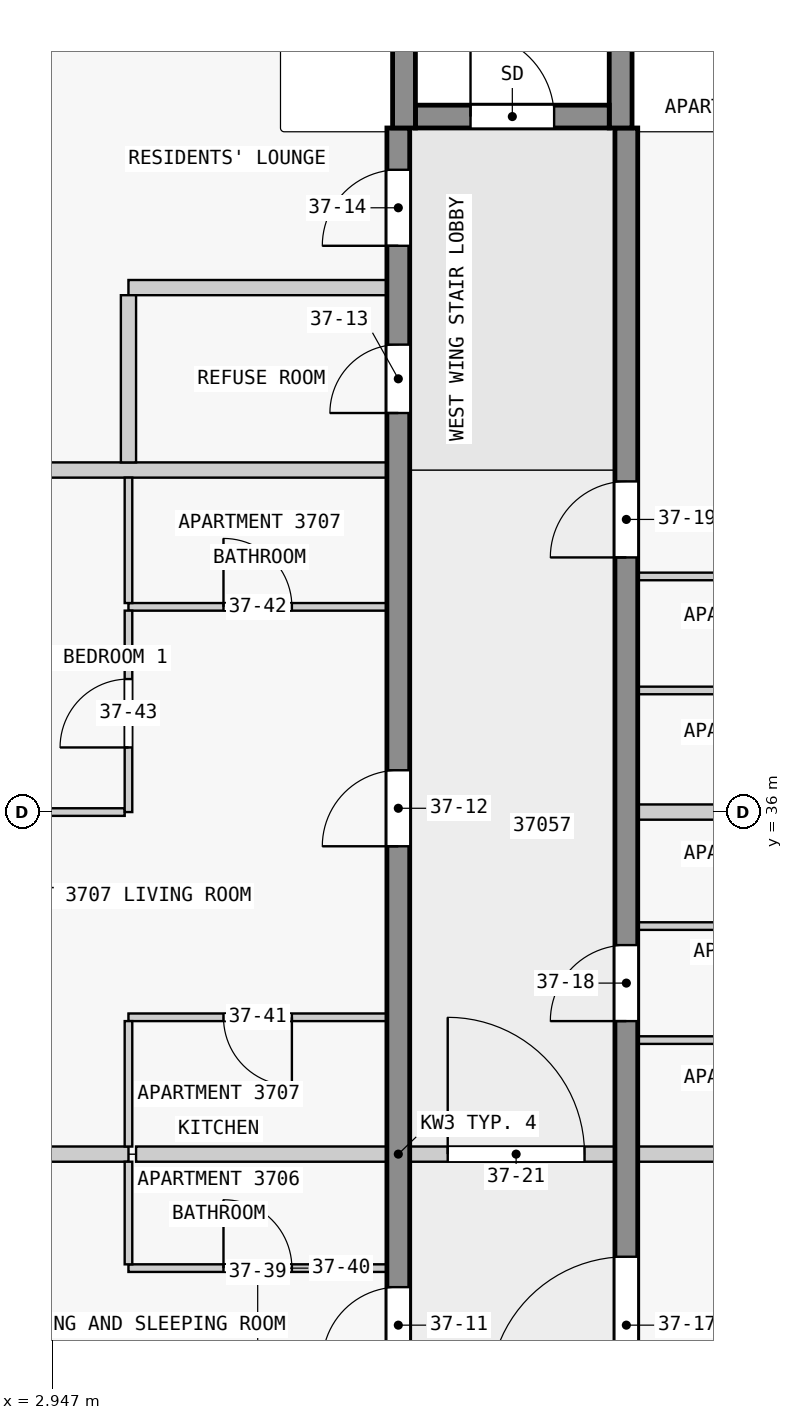
"""IFC4 building model, lengths in metres.
Left out: names, types, materials, properties, quantities, classifications, styles, units other than length and angle.
Written with IfcOpenShell. Run it as: python <this file> out.ifc"""

import sys

from ifc_helpers import new_model, si_unit, direction, frame, frame_2d, origin, place, context, subcontext, project, spatial, rectangle, extrude, element, fill, save


model = new_model("IFC4")
c1 = context("Model", 3, precision=1e-05, world=origin(), true_north=direction((0.0, 1.0)))
c2 = subcontext(c1, "Body", "Model", "MODEL_VIEW")
j1 = project(units=[si_unit("LENGTHUNIT", "METRE"), si_unit("PLANEANGLEUNIT", "RADIAN")], contexts=[c1])
p1 = place(None, origin())
s1 = spatial("IfcSite", under=j1, at=p1, CompositionType="ELEMENT")
p2 = place(p1, origin())
s2 = spatial("IfcBuilding", under=s1, at=p2, CompositionType="ELEMENT")
p3 = place(p2, frame((0.0, 0.0, 146.4)))
s3 = spatial("IfcBuildingStorey", under=s2, at=p3, CompositionType="ELEMENT", Elevation=146.4)
p4 = place(p3, frame((7.725, 45.15, 0.0), z_axis=(0.0, 0.0, 1.0), x_axis=(1.0, 0.0, 0.0)))
e1 = element("IfcWall", 1, at=p4, inside=s3, PredefinedType="SHEAR", context=c2, shape_type="SweptSolid", body=[
    extrude(rectangle(XDim=2.55, YDim=0.3, at=frame_2d((1.275, 0.0))), origin(), (0.0, 0.0, 1.0), 3.5),
])
p5 = place(p4, frame((0.725, 0.0, 0.0)))
e2 = element("IfcOpeningElement", 2, at=p5, cuts=e1, PredefinedType="OPENING", context=c2, shape_type="SweptSolid", body=[
    extrude(rectangle(XDim=1.1, YDim=2.1, at=frame_2d((0.55, 1.05))), frame((0.0, 0.16, 0.0), z_axis=(0.0, -1.0, 0.0), x_axis=(1.0, 0.0, 0.0)), (0.0, 0.0, 1.0), 0.32),
])
for number, where, z_axis, x_axis in (
    (3, (7.575, 45.0, 0.0), (0.0, 0.0, 1.0), (0.0, 1.0, 0.0)),
    (4, (10.425, 45.0, 0.0), (0.0, 0.0, 1.0), (0.0, 1.0, 0.0)),
):
    element("IfcWall", number, at=place(p3, frame(where, z_axis=z_axis, x_axis=x_axis)), inside=s3, PredefinedType="SHEAR", context=c2, shape_type="SweptSolid", body=[
        extrude(rectangle(XDim=7.2, YDim=0.3, at=frame_2d((3.6, 0.0))), origin(), (0.0, 0.0, 1.0), 3.5),
    ])
p6 = place(p3, frame((7.5, 18.0, 0.0), z_axis=(0.0, 0.0, 1.0), x_axis=(0.0, 1.0, 0.0)))
e5 = element("IfcWall", 5, at=p6, inside=s3, PredefinedType="SHEAR", context=c2, shape_type="SweptSolid", body=[
    extrude(rectangle(XDim=27.0, YDim=0.3, at=frame_2d((13.5, 0.0))), origin(), (0.0, 0.0, 1.0), 3.25),
])
p7 = place(p6, frame((4.05, 0.0, 0.0)))
e6 = element("IfcOpeningElement", 6, at=p7, cuts=e5, PredefinedType="OPENING", context=c2, shape_type="SweptSolid", body=[
    extrude(rectangle(XDim=1.0, YDim=2.1, at=frame_2d((0.5, 1.05))), frame((0.0, 0.16, 0.0), z_axis=(0.0, -1.0, 0.0), x_axis=(1.0, 0.0, 0.0)), (0.0, 0.0, 1.0), 0.32),
])
p8 = place(p6, frame((10.75, 0.0, 0.0)))
e7 = element("IfcOpeningElement", 7, at=p8, cuts=e5, PredefinedType="OPENING", context=c2, shape_type="SweptSolid", body=[
    extrude(rectangle(XDim=1.0, YDim=2.1, at=frame_2d((0.5, 1.05))), frame((0.0, 0.16, 0.0), z_axis=(0.0, -1.0, 0.0), x_axis=(1.0, 0.0, 0.0)), (0.0, 0.0, 1.0), 0.32),
])
p9 = place(p6, frame((17.55, 0.0, 0.0)))
e8 = element("IfcOpeningElement", 8, at=p9, cuts=e5, PredefinedType="OPENING", context=c2, shape_type="SweptSolid", body=[
    extrude(rectangle(XDim=1.0, YDim=2.1, at=frame_2d((0.5, 1.05))), frame((0.0, 0.16, 0.0), z_axis=(0.0, -1.0, 0.0), x_axis=(1.0, 0.0, 0.0)), (0.0, 0.0, 1.0), 0.32),
])
p10 = place(p6, frame((23.25, 0.0, 0.0)))
e9 = element("IfcOpeningElement", 9, at=p10, cuts=e5, PredefinedType="OPENING", context=c2, shape_type="SweptSolid", body=[
    extrude(rectangle(XDim=0.9, YDim=2.1, at=frame_2d((0.45, 1.05))), frame((0.0, 0.16, 0.0), z_axis=(0.0, -1.0, 0.0), x_axis=(1.0, 0.0, 0.0)), (0.0, 0.0, 1.0), 0.32),
])
p11 = place(p6, frame((25.45, 0.0, 0.0)))
e10 = element("IfcOpeningElement", 10, at=p11, cuts=e5, PredefinedType="OPENING", context=c2, shape_type="SweptSolid", body=[
    extrude(rectangle(XDim=1.0, YDim=2.1, at=frame_2d((0.5, 1.05))), frame((0.0, 0.16, 0.0), z_axis=(0.0, -1.0, 0.0), x_axis=(1.0, 0.0, 0.0)), (0.0, 0.0, 1.0), 0.32),
])
p12 = place(p3, frame((10.5, 18.0, 0.0), z_axis=(0.0, 0.0, 1.0), x_axis=(0.0, 1.0, 0.0)))
e11 = element("IfcWall", 11, at=p12, inside=s3, PredefinedType="SHEAR", context=c2, shape_type="SweptSolid", body=[
    extrude(rectangle(XDim=27.0, YDim=0.3, at=frame_2d((13.5, 0.0))), origin(), (0.0, 0.0, 1.0), 3.25),
])
p13 = place(p12, frame((1.75, 0.0, 0.0)))
e12 = element("IfcOpeningElement", 12, at=p13, cuts=e11, PredefinedType="OPENING", context=c2, shape_type="SweptSolid", body=[
    extrude(rectangle(XDim=1.0, YDim=2.1, at=frame_2d((0.5, 1.05))), frame((0.0, 0.16, 0.0), z_axis=(0.0, -1.0, 0.0), x_axis=(1.0, 0.0, 0.0)), (0.0, 0.0, 1.0), 0.32),
])
p14 = place(p12, frame((6.25, 0.0, 0.0)))
e13 = element("IfcOpeningElement", 13, at=p14, cuts=e11, PredefinedType="OPENING", context=c2, shape_type="SweptSolid", body=[
    extrude(rectangle(XDim=1.0, YDim=2.1, at=frame_2d((0.5, 1.05))), frame((0.0, 0.16, 0.0), z_axis=(0.0, -1.0, 0.0), x_axis=(1.0, 0.0, 0.0)), (0.0, 0.0, 1.0), 0.32),
])
p15 = place(p12, frame((10.35, 0.0, 0.0)))
e14 = element("IfcOpeningElement", 14, at=p15, cuts=e11, PredefinedType="OPENING", context=c2, shape_type="SweptSolid", body=[
    extrude(rectangle(XDim=1.8, YDim=2.1, at=frame_2d((0.9, 1.05))), frame((0.0, 0.16, 0.0), z_axis=(0.0, -1.0, 0.0), x_axis=(1.0, 0.0, 0.0)), (0.0, 0.0, 1.0), 0.32),
])
p16 = place(p12, frame((15.25, 0.0, 0.0)))
e15 = element("IfcOpeningElement", 15, at=p16, cuts=e11, PredefinedType="OPENING", context=c2, shape_type="SweptSolid", body=[
    extrude(rectangle(XDim=1.0, YDim=2.1, at=frame_2d((0.5, 1.05))), frame((0.0, 0.16, 0.0), z_axis=(0.0, -1.0, 0.0), x_axis=(1.0, 0.0, 0.0)), (0.0, 0.0, 1.0), 0.32),
])
p17 = place(p12, frame((21.35, 0.0, 0.0)))
e16 = element("IfcOpeningElement", 16, at=p17, cuts=e11, PredefinedType="OPENING", context=c2, shape_type="SweptSolid", body=[
    extrude(rectangle(XDim=1.0, YDim=2.1, at=frame_2d((0.5, 1.05))), frame((0.0, 0.16, 0.0), z_axis=(0.0, -1.0, 0.0), x_axis=(1.0, 0.0, 0.0)), (0.0, 0.0, 1.0), 0.32),
])
p18 = place(p3, frame((3.95, 30.0, 0.0), z_axis=(0.0, 0.0, 1.0), x_axis=(1.0, 0.0, 0.0)))
e17 = element("IfcWall", 17, at=p18, inside=s3, PredefinedType="PARTITIONING", context=c2, shape_type="SweptSolid", body=[
    extrude(rectangle(XDim=3.4, YDim=0.1, at=frame_2d((1.7, 0.0))), origin(), (0.0, 0.0, 1.0), 3.25),
])
p19 = place(p18, frame((1.25, 0.0, 0.0)))
e18 = element("IfcOpeningElement", 18, at=p19, cuts=e17, PredefinedType="OPENING", context=c2, shape_type="SweptSolid", body=[
    extrude(rectangle(XDim=0.9, YDim=2.1, at=frame_2d((0.45, 1.05))), frame((0.0, 0.06, 0.0), z_axis=(0.0, -1.0, 0.0), x_axis=(1.0, 0.0, 0.0)), (0.0, 0.0, 1.0), 0.12),
])
p20 = place(p3, frame((7.35, 31.5, 0.0), z_axis=(0.0, 0.0, 1.0), x_axis=(-1.0, 0.0, 0.0)))
e19 = element("IfcWall", 19, at=p20, inside=s3, PredefinedType="PARTITIONING", context=c2, shape_type="SweptSolid", body=[
    extrude(rectangle(XDim=3.3, YDim=0.2, at=frame_2d((1.65, 0.0))), origin(), (0.0, 0.0, 1.0), 3.25),
])
p21 = place(p3, frame((17.85, 31.5, 0.0), z_axis=(0.0, 0.0, 1.0), x_axis=(-1.0, 0.0, 0.0)))
e20 = element("IfcWall", 20, at=p21, inside=s3, PredefinedType="PARTITIONING", context=c2, shape_type="SweptSolid", body=[
    extrude(rectangle(XDim=7.2, YDim=0.2, at=frame_2d((3.6, 0.0))), origin(), (0.0, 0.0, 1.0), 3.25),
])
p22 = place(p3, frame((0.15, 31.5, 0.0), z_axis=(0.0, 0.0, 1.0), x_axis=(1.0, 0.0, 0.0)))
e21 = element("IfcWall", 21, at=p22, inside=s3, PredefinedType="PARTITIONING", context=c2, shape_type="SweptSolid", body=[
    extrude(rectangle(XDim=3.8, YDim=0.2, at=frame_2d((1.9, 0.0))), origin(), (0.0, 0.0, 1.0), 3.25),
])
p23 = place(p3, frame((14.05, 33.0, 0.0), z_axis=(0.0, 0.0, 1.0), x_axis=(-1.0, 0.0, 0.0)))
e22 = element("IfcWall", 22, at=p23, inside=s3, PredefinedType="PARTITIONING", context=c2, shape_type="SweptSolid", body=[
    extrude(rectangle(XDim=3.4, YDim=0.1, at=frame_2d((1.7, 0.0))), origin(), (0.0, 0.0, 1.0), 3.25),
])
p24 = place(p23, frame((1.25, 0.0, 0.0)))
e23 = element("IfcOpeningElement", 23, at=p24, cuts=e22, PredefinedType="OPENING", context=c2, shape_type="SweptSolid", body=[
    extrude(rectangle(XDim=0.9, YDim=2.1, at=frame_2d((0.45, 1.05))), frame((0.0, 0.06, 0.0), z_axis=(0.0, -1.0, 0.0), x_axis=(1.0, 0.0, 0.0)), (0.0, 0.0, 1.0), 0.12),
])
p25 = place(p3, frame((7.35, 33.3, 0.0), z_axis=(0.0, 0.0, 1.0), x_axis=(-1.0, 0.0, 0.0)))
e24 = element("IfcWall", 24, at=p25, inside=s3, PredefinedType="PARTITIONING", context=c2, shape_type="SweptSolid", body=[
    extrude(rectangle(XDim=3.4, YDim=0.1, at=frame_2d((1.7, 0.0))), origin(), (0.0, 0.0, 1.0), 3.25),
])
p26 = place(p25, frame((1.25, 0.0, 0.0)))
e25 = element("IfcOpeningElement", 25, at=p26, cuts=e24, PredefinedType="OPENING", context=c2, shape_type="SweptSolid", body=[
    extrude(rectangle(XDim=0.9, YDim=2.1, at=frame_2d((0.45, 1.05))), frame((0.0, 0.06, 0.0), z_axis=(0.0, -1.0, 0.0), x_axis=(1.0, 0.0, 0.0)), (0.0, 0.0, 1.0), 0.12),
])
p27 = place(p3, frame((10.65, 34.5, 0.0), z_axis=(0.0, 0.0, 1.0), x_axis=(1.0, 0.0, 0.0)))
e26 = element("IfcWall", 26, at=p27, inside=s3, PredefinedType="PARTITIONING", context=c2, shape_type="SweptSolid", body=[
    extrude(rectangle(XDim=3.35, YDim=0.1, at=frame_2d((1.675, 0.0))), origin(), (0.0, 0.0, 1.0), 3.25),
])
p28 = place(p27, frame((1.25, 0.0, 0.0)))
e27 = element("IfcOpeningElement", 27, at=p28, cuts=e26, PredefinedType="OPENING", context=c2, shape_type="SweptSolid", body=[
    extrude(rectangle(XDim=0.9, YDim=2.1, at=frame_2d((0.45, 1.05))), frame((0.0, 0.06, 0.0), z_axis=(0.0, -1.0, 0.0), x_axis=(1.0, 0.0, 0.0)), (0.0, 0.0, 1.0), 0.12),
])
p29 = place(p3, frame((1.4, 36.0, 0.0), z_axis=(0.0, 0.0, 1.0), x_axis=(1.0, 0.0, 0.0)))
e28 = element("IfcWall", 28, at=p29, inside=s3, PredefinedType="PARTITIONING", context=c2, shape_type="SweptSolid", body=[
    extrude(rectangle(XDim=2.5, YDim=0.1, at=frame_2d((1.25, 0.0))), origin(), (0.0, 0.0, 1.0), 3.25),
])
p30 = place(p3, frame((14.05, 36.0, 0.0), z_axis=(0.0, 0.0, 1.0), x_axis=(-1.0, 0.0, 0.0)))
e29 = element("IfcWall", 29, at=p30, inside=s3, PredefinedType="PARTITIONING", context=c2, shape_type="SweptSolid", body=[
    extrude(rectangle(XDim=3.4, YDim=0.2, at=frame_2d((1.7, 0.0))), origin(), (0.0, 0.0, 1.0), 3.25),
])
p31 = place(p3, frame((14.0, 37.6, 0.0), z_axis=(0.0, 0.0, 1.0), x_axis=(-1.0, 0.0, 0.0)))
e30 = element("IfcWall", 30, at=p31, inside=s3, PredefinedType="PARTITIONING", context=c2, shape_type="SweptSolid", body=[
    extrude(rectangle(XDim=3.35, YDim=0.1, at=frame_2d((1.675, 0.0))), origin(), (0.0, 0.0, 1.0), 3.25),
])
p32 = place(p3, frame((3.95, 38.7, 0.0), z_axis=(0.0, 0.0, 1.0), x_axis=(1.0, 0.0, 0.0)))
e31 = element("IfcWall", 31, at=p32, inside=s3, PredefinedType="PARTITIONING", context=c2, shape_type="SweptSolid", body=[
    extrude(rectangle(XDim=3.4, YDim=0.1, at=frame_2d((1.7, 0.0))), origin(), (0.0, 0.0, 1.0), 3.25),
])
p33 = place(p32, frame((1.25, 0.0, 0.0)))
e32 = element("IfcOpeningElement", 32, at=p33, cuts=e31, PredefinedType="OPENING", context=c2, shape_type="SweptSolid", body=[
    extrude(rectangle(XDim=0.9, YDim=2.1, at=frame_2d((0.45, 1.05))), frame((0.0, 0.06, 0.0), z_axis=(0.0, -1.0, 0.0), x_axis=(1.0, 0.0, 0.0)), (0.0, 0.0, 1.0), 0.12),
])
p34 = place(p3, frame((14.0, 39.1, 0.0), z_axis=(0.0, 0.0, 1.0), x_axis=(-1.0, 0.0, 0.0)))
e33 = element("IfcWall", 33, at=p34, inside=s3, PredefinedType="PARTITIONING", context=c2, shape_type="SweptSolid", body=[
    extrude(rectangle(XDim=3.35, YDim=0.1, at=frame_2d((1.675, 0.0))), origin(), (0.0, 0.0, 1.0), 3.25),
])
p35 = place(p34, frame((1.25, 0.0, 0.0)))
e34 = element("IfcOpeningElement", 34, at=p35, cuts=e33, PredefinedType="OPENING", context=c2, shape_type="SweptSolid", body=[
    extrude(rectangle(XDim=0.9, YDim=2.1, at=frame_2d((0.45, 1.05))), frame((0.0, 0.06, 0.0), z_axis=(0.0, -1.0, 0.0), x_axis=(1.0, 0.0, 0.0)), (0.0, 0.0, 1.0), 0.12),
])
p36 = place(p3, frame((7.35, 40.5, 0.0), z_axis=(0.0, 0.0, 1.0), x_axis=(-1.0, 0.0, 0.0)))
e35 = element("IfcWall", 35, at=p36, inside=s3, PredefinedType="PARTITIONING", context=c2, shape_type="SweptSolid", body=[
    extrude(rectangle(XDim=7.43, YDim=0.2, at=frame_2d((3.715, 0.0))), origin(), (0.0, 0.0, 1.0), 3.25),
])
p37 = place(p3, frame((7.35, 42.9, 0.0), z_axis=(0.0, 0.0, 1.0), x_axis=(-1.0, 0.0, 0.0)))
e36 = element("IfcWall", 36, at=p37, inside=s3, PredefinedType="PARTITIONING", context=c2, shape_type="SweptSolid", body=[
    extrude(rectangle(XDim=3.4, YDim=0.2, at=frame_2d((1.7, 0.0))), origin(), (0.0, 0.0, 1.0), 3.25),
])
p38 = place(p3, frame((3.95, 31.4, 0.0), z_axis=(0.0, 0.0, 1.0), x_axis=(0.0, -1.0, 0.0)))
e37 = element("IfcWall", 37, at=p38, inside=s3, PredefinedType="PARTITIONING", context=c2, shape_type="SweptSolid", body=[
    extrude(rectangle(XDim=1.35, YDim=0.1, at=frame_2d((0.675, 0.0))), origin(), (0.0, 0.0, 1.0), 3.25),
])
for number, where, z_axis, x_axis in (
    (38, (3.95, 33.25, 0.0), (0.0, 0.0, 1.0), (0.0, -1.0, 0.0)),
    (39, (3.95, 40.4, 0.0), (0.0, 0.0, 1.0), (0.0, -1.0, 0.0)),
):
    element("IfcWall", number, at=place(p3, frame(where, z_axis=z_axis, x_axis=x_axis)), inside=s3, PredefinedType="PARTITIONING", context=c2, shape_type="SweptSolid", body=[
        extrude(rectangle(XDim=1.65, YDim=0.1, at=frame_2d((0.825, 0.0))), origin(), (0.0, 0.0, 1.0), 3.25),
    ])
p39 = place(p3, frame((3.95, 36.0, 0.0), z_axis=(0.0, 0.0, 1.0), x_axis=(0.0, 1.0, 0.0)))
e40 = element("IfcWall", 40, at=p39, inside=s3, PredefinedType="PARTITIONING", context=c2, shape_type="SweptSolid", body=[
    extrude(rectangle(XDim=2.65, YDim=0.1, at=frame_2d((1.325, 0.0))), origin(), (0.0, 0.0, 1.0), 3.25),
])
p40 = place(p39, frame((0.85, 0.0, 0.0)))
e41 = element("IfcOpeningElement", 41, at=p40, cuts=e40, PredefinedType="OPENING", context=c2, shape_type="SweptSolid", body=[
    extrude(rectangle(XDim=0.9, YDim=2.1, at=frame_2d((0.45, 1.05))), frame((0.0, 0.06, 0.0), z_axis=(0.0, -1.0, 0.0), x_axis=(1.0, 0.0, 0.0)), (0.0, 0.0, 1.0), 0.12),
])
p41 = place(p3, frame((3.95, 42.8, 0.0), z_axis=(0.0, 0.0, 1.0), x_axis=(0.0, -1.0, 0.0)))
e42 = element("IfcWall", 42, at=p41, inside=s3, PredefinedType="PARTITIONING", context=c2, shape_type="SweptSolid", body=[
    extrude(rectangle(XDim=2.2, YDim=0.2, at=frame_2d((1.1, 0.0))), origin(), (0.0, 0.0, 1.0), 3.25),
])
p42 = place(p3, frame((7.45, 31.5, 0.0), z_axis=(0.0, 0.0, 1.0), x_axis=(1.0, 0.0, 0.0)))
e43 = element("IfcWall", 43, at=p42, inside=s3, PredefinedType="PARTITIONING", context=c2, shape_type="SweptSolid", body=[
    extrude(rectangle(XDim=3.1, YDim=0.2, at=frame_2d((1.55, 0.0))), origin(), (0.0, 0.0, 1.0), 3.25),
])
p43 = place(p42, frame((0.7, 0.0, 0.0)))
e44 = element("IfcOpeningElement", 44, at=p43, cuts=e43, PredefinedType="OPENING", context=c2, shape_type="SweptSolid", body=[
    extrude(rectangle(XDim=1.8, YDim=2.1, at=frame_2d((0.9, 1.05))), frame((0.0, 0.11, 0.0), z_axis=(0.0, -1.0, 0.0), x_axis=(1.0, 0.0, 0.0)), (0.0, 0.0, 1.0), 0.22),
])
p44 = place(p5, origin())
e45 = element("IfcDoor", 45, at=p44, inside=s3, OperationType="SINGLE_SWING_LEFT", PredefinedType="DOOR", context=c2, shape_type="SweptSolid", body=[
    extrude(rectangle(XDim=1.1, YDim=2.1, at=frame_2d((0.55, 1.05))), frame((0.0, 0.025, 0.0), z_axis=(0.0, -1.0, 0.0), x_axis=(1.0, 0.0, 0.0)), (0.0, 0.0, 1.0), 0.05),
])
fill(e2, e45)
p45 = place(p8, origin())
e46 = element("IfcDoor", 46, at=p45, inside=s3, OperationType="SINGLE_SWING_LEFT", PredefinedType="DOOR", context=c2, shape_type="SweptSolid", body=[
    extrude(rectangle(XDim=1.0, YDim=2.1, at=frame_2d((0.5, 1.05))), frame((0.0, 0.025, 0.0), z_axis=(0.0, -1.0, 0.0), x_axis=(1.0, 0.0, 0.0)), (0.0, 0.0, 1.0), 0.05),
])
fill(e7, e46)
p46 = place(p9, origin())
e47 = element("IfcDoor", 47, at=p46, inside=s3, OperationType="SINGLE_SWING_RIGHT", PredefinedType="DOOR", context=c2, shape_type="SweptSolid", body=[
    extrude(rectangle(XDim=1.0, YDim=2.1, at=frame_2d((0.5, 1.05))), frame((0.0, 0.025, 0.0), z_axis=(0.0, -1.0, 0.0), x_axis=(1.0, 0.0, 0.0)), (0.0, 0.0, 1.0), 0.05),
])
fill(e8, e47)
p47 = place(p10, origin())
e48 = element("IfcDoor", 48, at=p47, inside=s3, OperationType="SINGLE_SWING_RIGHT", PredefinedType="DOOR", context=c2, shape_type="SweptSolid", body=[
    extrude(rectangle(XDim=0.9, YDim=2.1, at=frame_2d((0.45, 1.05))), frame((0.0, 0.025, 0.0), z_axis=(0.0, -1.0, 0.0), x_axis=(1.0, 0.0, 0.0)), (0.0, 0.0, 1.0), 0.05),
])
fill(e9, e48)
p48 = place(p11, origin())
e49 = element("IfcDoor", 49, at=p48, inside=s3, OperationType="SINGLE_SWING_RIGHT", PredefinedType="DOOR", context=c2, shape_type="SweptSolid", body=[
    extrude(rectangle(XDim=1.0, YDim=2.1, at=frame_2d((0.5, 1.05))), frame((0.0, 0.025, 0.0), z_axis=(0.0, -1.0, 0.0), x_axis=(1.0, 0.0, 0.0)), (0.0, 0.0, 1.0), 0.05),
])
fill(e10, e49)
p49 = place(p15, origin())
e50 = element("IfcDoor", 50, at=p49, inside=s3, OperationType="SINGLE_SWING_LEFT", PredefinedType="DOOR", context=c2, shape_type="SweptSolid", body=[
    extrude(rectangle(XDim=1.8, YDim=2.1, at=frame_2d((0.9, 1.05))), frame((0.0, 0.025, 0.0), z_axis=(0.0, -1.0, 0.0), x_axis=(1.0, 0.0, 0.0)), (0.0, 0.0, 1.0), 0.05),
])
fill(e14, e50)
p50 = place(p16, origin())
e51 = element("IfcDoor", 51, at=p50, inside=s3, OperationType="SINGLE_SWING_RIGHT", PredefinedType="DOOR", context=c2, shape_type="SweptSolid", body=[
    extrude(rectangle(XDim=1.0, YDim=2.1, at=frame_2d((0.5, 1.05))), frame((0.0, 0.025, 0.0), z_axis=(0.0, -1.0, 0.0), x_axis=(1.0, 0.0, 0.0)), (0.0, 0.0, 1.0), 0.05),
])
fill(e15, e51)
p51 = place(p17, origin())
e52 = element("IfcDoor", 52, at=p51, inside=s3, OperationType="SINGLE_SWING_RIGHT", PredefinedType="DOOR", context=c2, shape_type="SweptSolid", body=[
    extrude(rectangle(XDim=1.0, YDim=2.1, at=frame_2d((0.5, 1.05))), frame((0.0, 0.025, 0.0), z_axis=(0.0, -1.0, 0.0), x_axis=(1.0, 0.0, 0.0)), (0.0, 0.0, 1.0), 0.05),
])
fill(e16, e52)
p52 = place(p43, origin())
e53 = element("IfcDoor", 53, at=p52, inside=s3, OperationType="SINGLE_SWING_RIGHT", PredefinedType="DOOR", context=c2, shape_type="SweptSolid", body=[
    extrude(rectangle(XDim=1.8, YDim=2.1, at=frame_2d((0.9, 1.05))), frame((0.0, 0.025, 0.0), z_axis=(0.0, -1.0, 0.0), x_axis=(1.0, 0.0, 0.0)), (0.0, 0.0, 1.0), 0.05),
])
fill(e44, e53)
p53 = place(p19, origin())
e54 = element("IfcDoor", 54, at=p53, inside=s3, OperationType="SINGLE_SWING_RIGHT", PredefinedType="DOOR", context=c2, shape_type="SweptSolid", body=[
    extrude(rectangle(XDim=0.9, YDim=2.1, at=frame_2d((0.45, 1.05))), frame((0.0, 0.025, 0.0), z_axis=(0.0, -1.0, 0.0), x_axis=(1.0, 0.0, 0.0)), (0.0, 0.0, 1.0), 0.05),
])
fill(e18, e54)
p54 = place(p26, origin())
e55 = element("IfcDoor", 55, at=p54, inside=s3, OperationType="SINGLE_SWING_RIGHT", PredefinedType="DOOR", context=c2, shape_type="SweptSolid", body=[
    extrude(rectangle(XDim=0.9, YDim=2.1, at=frame_2d((0.45, 1.05))), frame((0.0, 0.025, 0.0), z_axis=(0.0, -1.0, 0.0), x_axis=(1.0, 0.0, 0.0)), (0.0, 0.0, 1.0), 0.05),
])
fill(e25, e55)
p55 = place(p33, origin())
e56 = element("IfcDoor", 56, at=p55, inside=s3, OperationType="SINGLE_SWING_RIGHT", PredefinedType="DOOR", context=c2, shape_type="SweptSolid", body=[
    extrude(rectangle(XDim=0.9, YDim=2.1, at=frame_2d((0.45, 1.05))), frame((0.0, 0.025, 0.0), z_axis=(0.0, -1.0, 0.0), x_axis=(1.0, 0.0, 0.0)), (0.0, 0.0, 1.0), 0.05),
])
fill(e32, e56)
p56 = place(p40, origin())
e57 = element("IfcDoor", 57, at=p56, inside=s3, OperationType="SINGLE_SWING_LEFT", PredefinedType="DOOR", context=c2, shape_type="SweptSolid", body=[
    extrude(rectangle(XDim=0.9, YDim=2.1, at=frame_2d((0.45, 1.05))), frame((0.0, 0.025, 0.0), z_axis=(0.0, -1.0, 0.0), x_axis=(1.0, 0.0, 0.0)), (0.0, 0.0, 1.0), 0.05),
])
fill(e41, e57)
save(model, sys.argv[1])
